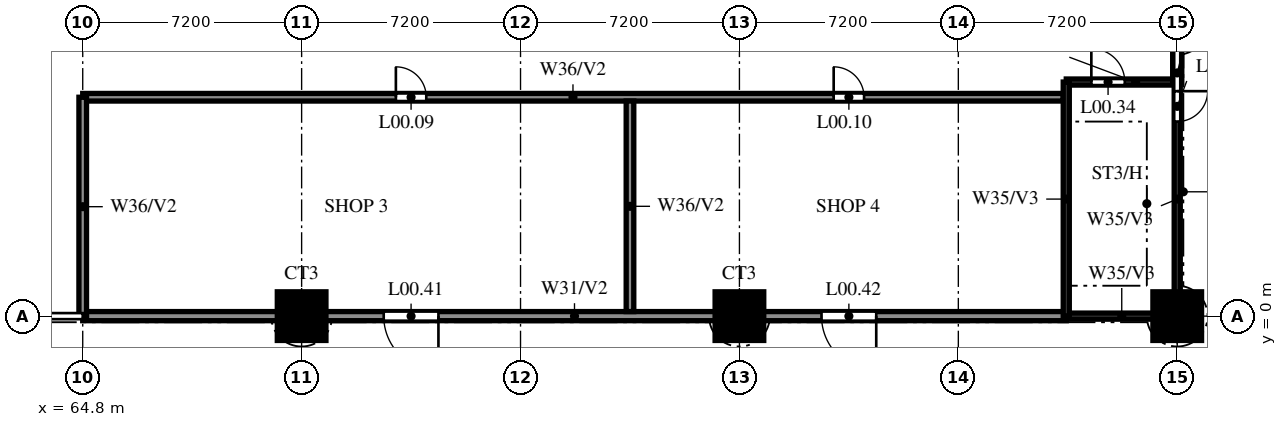
"""IFC4 building model, lengths in metres.
Left out: names, types, materials, properties, quantities, classifications, styles, units other than length and angle.
Written with IfcOpenShell. Run it as: python <this file> out.ifc"""

import sys

from ifc_helpers import new_model, si_unit, direction, frame, frame_2d, origin, origin_2d, place, context, subcontext, project, spatial, rectangle, circle, extrude, source, transform, mapped, element, fill, save


model = new_model("IFC4")
c1 = context("Model", 3, precision=1e-05, world=origin(), true_north=direction((0.0, 1.0)))
c2 = subcontext(c1, "Body", "Model", "MODEL_VIEW")
j1 = project(units=[si_unit("LENGTHUNIT", "METRE"), si_unit("PLANEANGLEUNIT", "RADIAN")], contexts=[c1])
p1 = place(None, origin())
s1 = spatial("IfcSite", under=j1, at=p1, CompositionType="ELEMENT")
p2 = place(p1, origin())
s2 = spatial("IfcBuilding", under=s1, at=p2, CompositionType="ELEMENT")
p3 = place(p2, origin())
s3 = spatial("IfcBuildingStorey", under=s2, at=p3, CompositionType="ELEMENT", Elevation=0.0)
m1 = source(origin(), c2, "Body", "SweptSolid", [
    extrude(circle(Radius=0.8, at=origin_2d()), origin(), (0.0, 0.0, 1.0), 7.4),
])
for number, where, z_axis, x_axis in (
    (1, (72.0, 0.0, 0.0), (0.0, 0.0, 1.0), (1.0, 0.0, 0.0)),
    (2, (86.4, 0.0, 0.0), (0.0, 0.0, 1.0), (1.0, 0.0, 0.0)),
    (3, (100.8, 0.0, 0.0), (0.0, 0.0, 1.0), (1.0, 0.0, 0.0)),
):
    element("IfcColumn", number, at=place(p3, frame(where, z_axis=z_axis, x_axis=x_axis)), inside=s3, PredefinedType="COLUMN", context=c2, shape_type="MappedRepresentation", body=[
        mapped(m1, transform((0.0, 0.0, 0.0))),
    ])
p4 = place(p3, frame((97.15, 0.0, 0.0), z_axis=(0.0, 0.0, 1.0), x_axis=(-1.0, 0.0, 0.0)))
e4 = element("IfcWall", 4, at=p4, inside=s3, PredefinedType="SOLIDWALL", context=c2, shape_type="SweptSolid", body=[
    extrude(rectangle(XDim=32.35, YDim=0.3, at=frame_2d((16.175, 0.0))), origin(), (0.0, 0.0, 1.0), 7.4),
])
p5 = place(p4, frame((20.65, 0.0, 0.0)))
e5 = element("IfcOpeningElement", 5, at=p5, cuts=e4, PredefinedType="OPENING", context=c2, shape_type="SweptSolid", body=[
    extrude(rectangle(XDim=1.8, YDim=2.1, at=frame_2d((0.9, 1.05))), frame((0.0, 0.16, 0.0), z_axis=(0.0, -1.0, 0.0), x_axis=(1.0, 0.0, 0.0)), (0.0, 0.0, 1.0), 0.32),
])
p6 = place(p4, frame((6.25, 0.0, 0.0)))
e6 = element("IfcOpeningElement", 6, at=p6, cuts=e4, PredefinedType="OPENING", context=c2, shape_type="SweptSolid", body=[
    extrude(rectangle(XDim=1.8, YDim=2.1, at=frame_2d((0.9, 1.05))), frame((0.0, 0.16, 0.0), z_axis=(0.0, -1.0, 0.0), x_axis=(1.0, 0.0, 0.0)), (0.0, 0.0, 1.0), 0.32),
])
p7 = place(p3, frame((97.15, 0.0, 0.0), z_axis=(0.0, 0.0, 1.0), x_axis=(1.0, 0.0, 0.0)))
e7 = element("IfcWall", 7, at=p7, inside=s3, PredefinedType="SOLIDWALL", context=c2, shape_type="SweptSolid", body=[
    extrude(rectangle(XDim=3.65, YDim=0.2, at=frame_2d((1.825, 0.0))), origin(), (0.0, 0.0, 1.0), 7.4),
])
p8 = place(p3, frame((64.8, 7.2, 0.0), z_axis=(0.0, 0.0, 1.0), x_axis=(1.0, 0.0, 0.0)))
e8 = element("IfcWall", 8, at=p8, inside=s3, PredefinedType="SOLIDWALL", context=c2, shape_type="SweptSolid", body=[
    extrude(rectangle(XDim=32.25, YDim=0.25, at=frame_2d((16.125, 0.0))), origin(), (0.0, 0.0, 1.0), 6.2),
])
p9 = place(p8, frame((10.3, 0.0, 0.0)))
e9 = element("IfcOpeningElement", 9, at=p9, cuts=e8, PredefinedType="OPENING", context=c2, shape_type="SweptSolid", body=[
    extrude(rectangle(XDim=1.0, YDim=2.1, at=frame_2d((0.5, 1.05))), frame((0.0, 0.135, 0.0), z_axis=(0.0, -1.0, 0.0), x_axis=(1.0, 0.0, 0.0)), (0.0, 0.0, 1.0), 0.27),
])
p10 = place(p8, frame((24.7, 0.0, 0.0)))
e10 = element("IfcOpeningElement", 10, at=p10, cuts=e8, PredefinedType="OPENING", context=c2, shape_type="SweptSolid", body=[
    extrude(rectangle(XDim=1.0, YDim=2.1, at=frame_2d((0.5, 1.05))), frame((0.0, 0.135, 0.0), z_axis=(0.0, -1.0, 0.0), x_axis=(1.0, 0.0, 0.0)), (0.0, 0.0, 1.0), 0.27),
])
p11 = place(p3, frame((97.15, 7.7, 0.0), z_axis=(0.0, 0.0, 1.0), x_axis=(1.0, 0.0, 0.0)))
e11 = element("IfcWall", 11, at=p11, inside=s3, PredefinedType="SOLIDWALL", context=c2, shape_type="SweptSolid", body=[
    extrude(rectangle(XDim=3.65, YDim=0.2, at=frame_2d((1.825, 0.0))), origin(), (0.0, 0.0, 1.0), 7.4),
])
p12 = place(p11, frame((0.825, 0.0, 0.0)))
e12 = element("IfcOpeningElement", 12, at=p12, cuts=e11, PredefinedType="OPENING", context=c2, shape_type="SweptSolid", body=[
    extrude(rectangle(XDim=1.1, YDim=2.1, at=frame_2d((0.55, 1.05))), frame((0.0, 0.11, 0.0), z_axis=(0.0, -1.0, 0.0), x_axis=(1.0, 0.0, 0.0)), (0.0, 0.0, 1.0), 0.22),
])
p13 = place(p3, frame((64.8, 0.0, 0.0), z_axis=(0.0, 0.0, 1.0), x_axis=(0.0, 1.0, 0.0)))
e13 = element("IfcWall", 13, at=p13, inside=s3, PredefinedType="SOLIDWALL", context=c2, shape_type="SweptSolid", body=[
    extrude(rectangle(XDim=7.2, YDim=0.25, at=frame_2d((3.6, 0.0))), origin(), (0.0, 0.0, 1.0), 6.2),
])
p14 = place(p3, frame((82.8, 0.15, 0.0), z_axis=(0.0, 0.0, 1.0), x_axis=(0.0, 1.0, 0.0)))
e14 = element("IfcWall", 14, at=p14, inside=s3, PredefinedType="SOLIDWALL", context=c2, shape_type="SweptSolid", body=[
    extrude(rectangle(XDim=6.925, YDim=0.25, at=frame_2d((3.462, 0.0))), origin(), (0.0, 0.0, 1.0), 6.2),
])
p15 = place(p3, frame((97.15, 0.0, 0.0), z_axis=(0.0, 0.0, 1.0), x_axis=(0.0, 1.0, 0.0)))
e15 = element("IfcWall", 15, at=p15, inside=s3, PredefinedType="SOLIDWALL", context=c2, shape_type="SweptSolid", body=[
    extrude(rectangle(XDim=7.7, YDim=0.2, at=frame_2d((3.85, 0.0))), origin(), (0.0, 0.0, 1.0), 7.4),
])
p16 = place(p3, frame((100.8, 42.9, 0.0), z_axis=(0.0, 0.0, 1.0), x_axis=(0.0, -1.0, 0.0)))
e16 = element("IfcWall", 16, at=p16, inside=s3, PredefinedType="SOLIDWALL", context=c2, shape_type="SweptSolid", body=[
    extrude(rectangle(XDim=35.2, YDim=0.3, at=frame_2d((17.6, 0.0))), origin(), (0.0, 0.0, 1.0), 7.4),
])
p17 = place(p16, frame((14.7, 0.0, 0.0)))
e17 = element("IfcOpeningElement", 17, at=p17, cuts=e16, PredefinedType="OPENING", context=c2, shape_type="SweptSolid", body=[
    extrude(rectangle(XDim=3.6, YDim=3.0, at=frame_2d((1.8, 1.5))), frame((0.0, 0.16, 0.0), z_axis=(0.0, -1.0, 0.0), x_axis=(1.0, 0.0, 0.0)), (0.0, 0.0, 1.0), 0.32),
])
p18 = place(p16, frame((11.4, 0.0, 0.0)))
e18 = element("IfcOpeningElement", 18, at=p18, cuts=e16, PredefinedType="OPENING", context=c2, shape_type="SweptSolid", body=[
    extrude(rectangle(XDim=1.8, YDim=2.1, at=frame_2d((0.9, 1.05))), frame((0.0, 0.16, 0.0), z_axis=(0.0, -1.0, 0.0), x_axis=(1.0, 0.0, 0.0)), (0.0, 0.0, 1.0), 0.32),
])
p19 = place(p16, frame((28.8, 0.0, 0.0)))
e19 = element("IfcOpeningElement", 19, at=p19, cuts=e16, PredefinedType="OPENING", context=c2, shape_type="SweptSolid", body=[
    extrude(rectangle(XDim=2.4, YDim=2.1, at=frame_2d((1.2, 1.05))), frame((0.0, 0.16, 0.0), z_axis=(0.0, -1.0, 0.0), x_axis=(1.0, 0.0, 0.0)), (0.0, 0.0, 1.0), 0.32),
])
p20 = place(p16, frame((25.8, 0.0, 0.0)))
e20 = element("IfcOpeningElement", 20, at=p20, cuts=e16, PredefinedType="OPENING", context=c2, shape_type="SweptSolid", body=[
    extrude(rectangle(XDim=2.4, YDim=2.1, at=frame_2d((1.2, 1.05))), frame((0.0, 0.16, 0.0), z_axis=(0.0, -1.0, 0.0), x_axis=(1.0, 0.0, 0.0)), (0.0, 0.0, 1.0), 0.32),
])
p21 = place(p16, frame((2.9, 0.0, 0.0)))
e21 = element("IfcOpeningElement", 21, at=p21, cuts=e16, PredefinedType="OPENING", context=c2, shape_type="SweptSolid", body=[
    extrude(rectangle(XDim=3.6, YDim=3.0, at=frame_2d((1.8, 1.5))), frame((0.0, 0.16, 0.0), z_axis=(0.0, -1.0, 0.0), x_axis=(1.0, 0.0, 0.0)), (0.0, 0.0, 1.0), 0.32),
])
p22 = place(p16, frame((0.8, 0.0, 0.0)))
e22 = element("IfcOpeningElement", 22, at=p22, cuts=e16, PredefinedType="OPENING", context=c2, shape_type="SweptSolid", body=[
    extrude(rectangle(XDim=1.8, YDim=2.1, at=frame_2d((0.9, 1.05))), frame((0.0, 0.16, 0.0), z_axis=(0.0, -1.0, 0.0), x_axis=(1.0, 0.0, 0.0)), (0.0, 0.0, 1.0), 0.32),
])
p23 = place(p3, frame((100.8, 7.7, 0.0), z_axis=(0.0, 0.0, 1.0), x_axis=(0.0, -1.0, 0.0)))
e23 = element("IfcWall", 23, at=p23, inside=s3, PredefinedType="SOLIDWALL", context=c2, shape_type="SweptSolid", body=[
    extrude(rectangle(XDim=7.7, YDim=0.2, at=frame_2d((3.85, 0.0))), origin(), (0.0, 0.0, 1.0), 7.4),
])
p24 = place(p23, frame((0.3, 0.0, 0.0)))
e24 = element("IfcOpeningElement", 24, at=p24, cuts=e23, PredefinedType="OPENING", context=c2, shape_type="SweptSolid", body=[
    extrude(rectangle(XDim=1.0, YDim=2.1, at=frame_2d((0.5, 1.05))), frame((0.0, 0.11, 0.0), z_axis=(0.0, -1.0, 0.0), x_axis=(1.0, 0.0, 0.0)), (0.0, 0.0, 1.0), 0.22),
])
p25 = place(p9, origin())
e25 = element("IfcDoor", 25, at=p25, inside=s3, OperationType="SINGLE_SWING_LEFT", PredefinedType="DOOR", context=c2, shape_type="SweptSolid", body=[
    extrude(rectangle(XDim=1.0, YDim=2.1, at=frame_2d((0.5, 1.05))), frame((0.0, 0.025, 0.0), z_axis=(0.0, -1.0, 0.0), x_axis=(1.0, 0.0, 0.0)), (0.0, 0.0, 1.0), 0.05),
])
fill(e9, e25)
p26 = place(p10, origin())
e26 = element("IfcDoor", 26, at=p26, inside=s3, OperationType="SINGLE_SWING_RIGHT", PredefinedType="DOOR", context=c2, shape_type="SweptSolid", body=[
    extrude(rectangle(XDim=1.0, YDim=2.1, at=frame_2d((0.5, 1.05))), frame((0.0, 0.025, 0.0), z_axis=(0.0, -1.0, 0.0), x_axis=(1.0, 0.0, 0.0)), (0.0, 0.0, 1.0), 0.05),
])
fill(e10, e26)
p27 = place(p12, origin())
e27 = element("IfcDoor", 27, at=p27, inside=s3, OperationType="SINGLE_SWING_LEFT", PredefinedType="DOOR", context=c2, shape_type="SweptSolid", body=[
    extrude(rectangle(XDim=1.1, YDim=2.1, at=frame_2d((0.55, 1.05))), frame((0.0, 0.025, 0.0), z_axis=(0.0, -1.0, 0.0), x_axis=(1.0, 0.0, 0.0)), (0.0, 0.0, 1.0), 0.05),
])
fill(e12, e27)
p28 = place(p5, origin())
e28 = element("IfcDoor", 28, at=p28, inside=s3, OperationType="DOUBLE_DOOR_SINGLE_SWING", PredefinedType="DOOR", context=c2, shape_type="SweptSolid", body=[
    extrude(rectangle(XDim=1.8, YDim=2.1, at=frame_2d((0.9, 1.05))), frame((0.0, 0.025, 0.0), z_axis=(0.0, -1.0, 0.0), x_axis=(1.0, 0.0, 0.0)), (0.0, 0.0, 1.0), 0.05),
])
fill(e5, e28)
p29 = place(p6, origin())
e29 = element("IfcDoor", 29, at=p29, inside=s3, OperationType="DOUBLE_DOOR_SINGLE_SWING", PredefinedType="DOOR", context=c2, shape_type="SweptSolid", body=[
    extrude(rectangle(XDim=1.8, YDim=2.1, at=frame_2d((0.9, 1.05))), frame((0.0, 0.025, 0.0), z_axis=(0.0, -1.0, 0.0), x_axis=(1.0, 0.0, 0.0)), (0.0, 0.0, 1.0), 0.05),
])
fill(e6, e29)
p30 = place(p24, origin())
e30 = element("IfcDoor", 30, at=p30, inside=s3, OperationType="SINGLE_SWING_LEFT", PredefinedType="DOOR", context=c2, shape_type="SweptSolid", body=[
    extrude(rectangle(XDim=1.0, YDim=2.1, at=frame_2d((0.5, 1.05))), frame((0.0, 0.025, 0.0), z_axis=(0.0, -1.0, 0.0), x_axis=(1.0, 0.0, 0.0)), (0.0, 0.0, 1.0), 0.05),
])
fill(e24, e30)
save(model, sys.argv[1])
